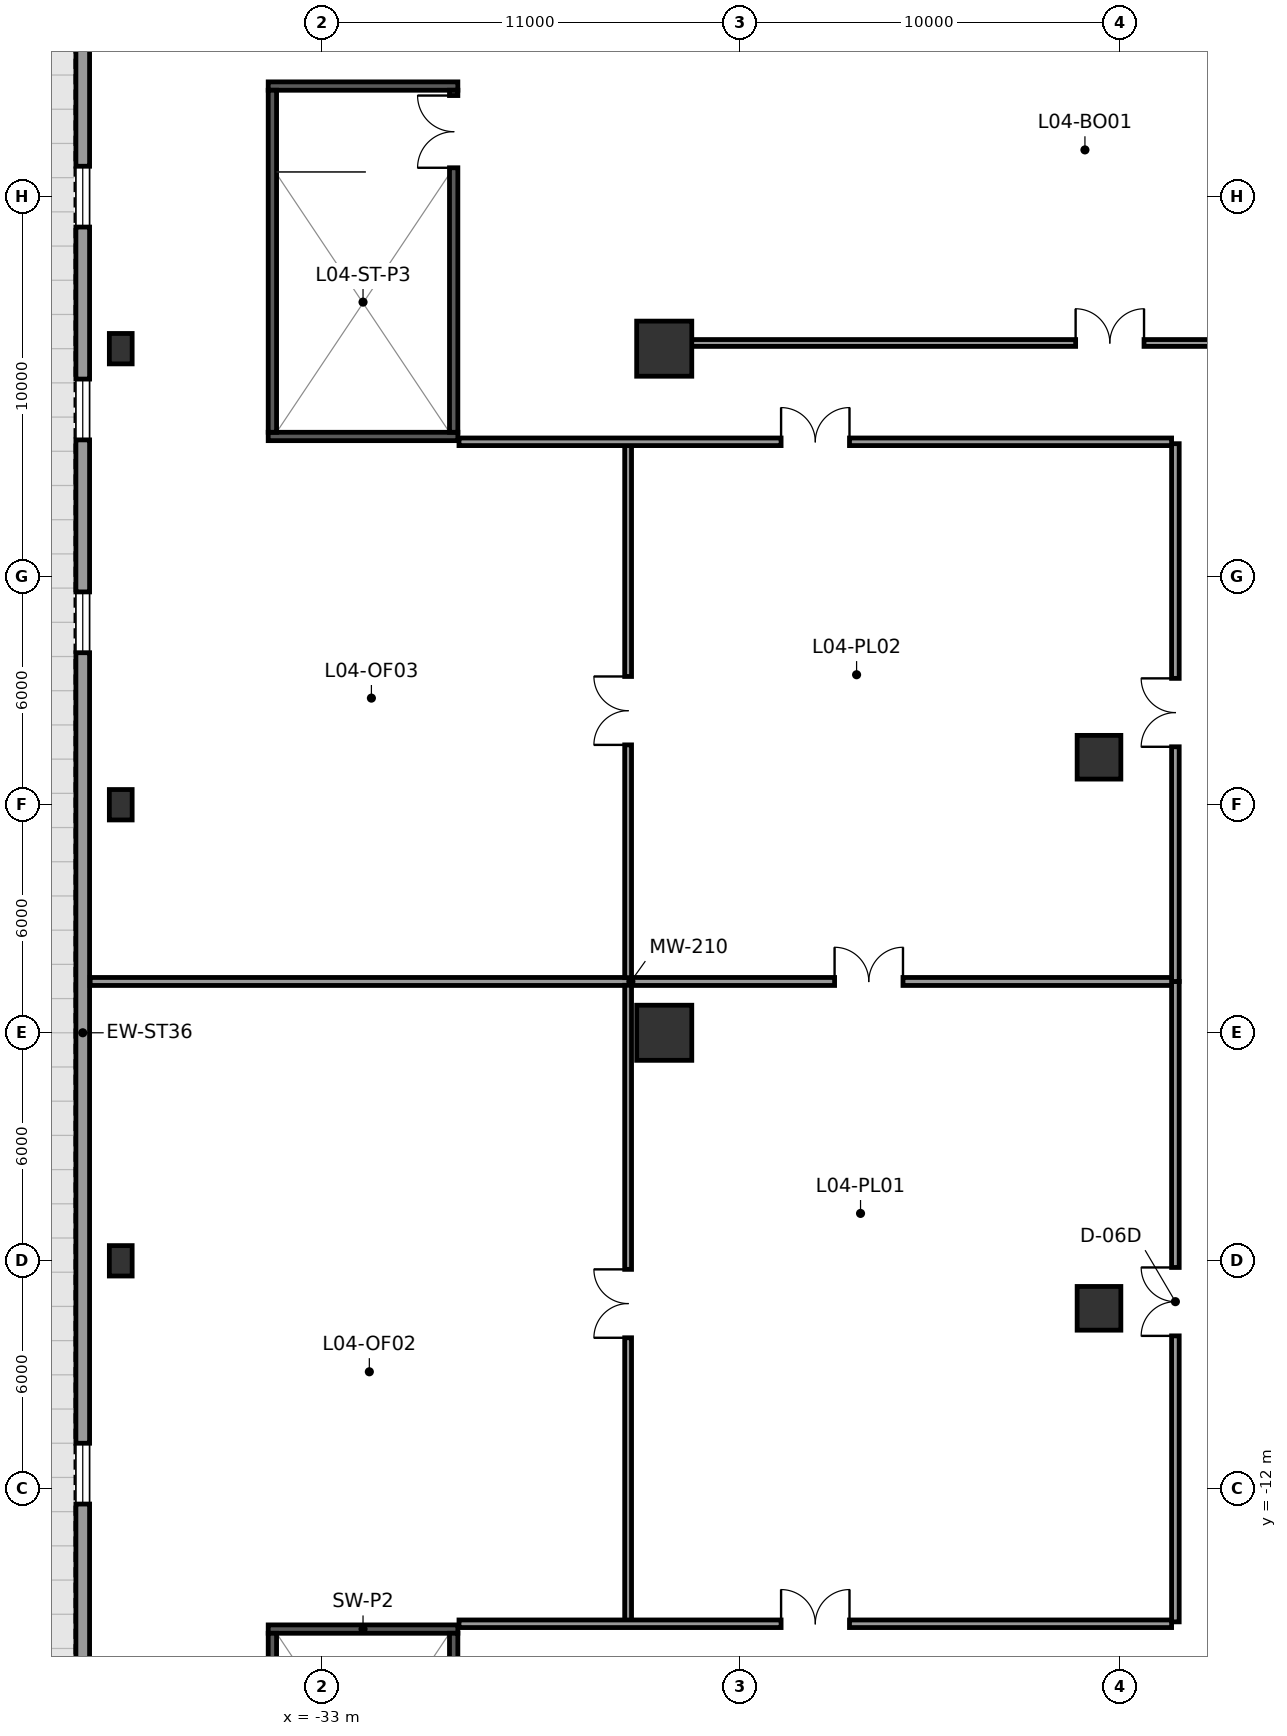
"""IFC4 building model, lengths in metres.
Left out: names, types, materials, properties, quantities, classifications, styles, units other than length and angle.
Written with IfcOpenShell. Run it as: python <this file> out.ifc"""

import sys

from ifc_helpers import new_model, si_unit, direction, frame, frame_2d, origin, origin_2d, place, context, subcontext, project, spatial, rectangle, hollow_rectangle, extrude, element, fill, save


model = new_model("IFC4")
c1 = context("Model", 3, precision=1e-05, world=origin(), true_north=direction((0.0, 1.0)))
c2 = subcontext(c1, "Body", "Model", "MODEL_VIEW")
j1 = project(units=[si_unit("LENGTHUNIT", "METRE"), si_unit("PLANEANGLEUNIT", "RADIAN")], contexts=[c1])
p1 = place(None, origin())
s1 = spatial("IfcSite", under=j1, at=p1, CompositionType="ELEMENT")
p2 = place(p1, origin())
s2 = spatial("IfcBuilding", under=s1, at=p2, CompositionType="ELEMENT")
p3 = place(p2, frame((0.0, 0.0, 23.5)))
s3 = spatial("IfcBuildingStorey", under=s2, at=p3, CompositionType="ELEMENT", Elevation=23.5)
for number, where, z_axis, x_axis in (
    (1, (-12.56, -7.25, 0.0), (0.0, 0.0, 1.0), (1.0, 0.0, 0.0)),
    (2, (-12.56, 7.25, 0.0), (0.0, 0.0, 1.0), (1.0, 0.0, 0.0)),
):
    element("IfcColumn", number, at=place(p3, frame(where, z_axis=z_axis, x_axis=x_axis)), inside=s3, PredefinedType="COLUMN", context=c2, shape_type="SweptSolid", body=[
        extrude(rectangle(XDim=1.15, YDim=1.15, at=origin_2d()), origin(), (0.0, 0.0, 1.0), 5.5),
    ])
for number, where, z_axis, x_axis in (
    (3, (-24.0, 0.0, 0.0), (0.0, 0.0, 1.0), (1.0, 0.0, 0.0)),
    (4, (-24.0, 18.0, 0.0), (0.0, 0.0, 1.0), (1.0, 0.0, 0.0)),
):
    element("IfcColumn", number, at=place(p3, frame(where, z_axis=z_axis, x_axis=x_axis)), inside=s3, PredefinedType="COLUMN", context=c2, shape_type="SweptSolid", body=[
        extrude(rectangle(XDim=1.45, YDim=1.45, at=origin_2d()), origin(), (0.0, 0.0, 1.0), 5.5),
    ])
for number, where, z_axis, x_axis in (
    (5, (-38.3, -6.0, 0.0), (0.0, 0.0, 1.0), (1.0, 0.0, 0.0)),
    (6, (-38.3, 6.0, 0.0), (0.0, 0.0, 1.0), (1.0, 0.0, 0.0)),
    (7, (-38.3, 18.0, 0.0), (0.0, 0.0, 1.0), (1.0, 0.0, 0.0)),
):
    element("IfcColumn", number, at=place(p3, frame(where, z_axis=z_axis, x_axis=x_axis)), inside=s3, PredefinedType="COLUMN", context=c2, shape_type="SweptSolid", body=[
        extrude(hollow_rectangle(XDim=0.6, YDim=0.8, WallThickness=0.05, at=origin_2d()), origin(), (0.0, 0.0, 1.0), 5.5),
    ])
p4 = place(p3, frame((-39.3, -28.4, 0.0), z_axis=(0.0, 0.0, 1.0), x_axis=(0.0, 1.0, 0.0)))
e8 = element("IfcWall", 8, at=p4, inside=s3, PredefinedType="STANDARD", context=c2, shape_type="SweptSolid", body=[
    extrude(rectangle(XDim=56.8, YDim=0.36, at=frame_2d((28.4, 0.0))), origin(), (0.0, 0.0, 1.0), 5.15),
])
p5 = place(p4, frame((4.8, 0.0, 0.9)))
e9 = element("IfcOpeningElement", 9, at=p5, cuts=e8, PredefinedType="OPENING", context=c2, shape_type="SweptSolid", body=[
    extrude(rectangle(XDim=1.6, YDim=2.6, at=frame_2d((0.8, 1.3))), frame((0.0, 0.19, 0.0), z_axis=(0.0, -1.0, 0.0), x_axis=(1.0, 0.0, 0.0)), (0.0, 0.0, 1.0), 0.38),
])
p6 = place(p4, frame((16.0, 0.0, 0.9)))
e10 = element("IfcOpeningElement", 10, at=p6, cuts=e8, PredefinedType="OPENING", context=c2, shape_type="SweptSolid", body=[
    extrude(rectangle(XDim=1.6, YDim=2.6, at=frame_2d((0.8, 1.3))), frame((0.0, 0.19, 0.0), z_axis=(0.0, -1.0, 0.0), x_axis=(1.0, 0.0, 0.0)), (0.0, 0.0, 1.0), 0.38),
])
p7 = place(p4, frame((38.4, 0.0, 0.9)))
e11 = element("IfcOpeningElement", 11, at=p7, cuts=e8, PredefinedType="OPENING", context=c2, shape_type="SweptSolid", body=[
    extrude(rectangle(XDim=1.6, YDim=2.6, at=frame_2d((0.8, 1.3))), frame((0.0, 0.19, 0.0), z_axis=(0.0, -1.0, 0.0), x_axis=(1.0, 0.0, 0.0)), (0.0, 0.0, 1.0), 0.38),
])
p8 = place(p4, frame((44.0, 0.0, 0.9)))
e12 = element("IfcOpeningElement", 12, at=p8, cuts=e8, PredefinedType="OPENING", context=c2, shape_type="SweptSolid", body=[
    extrude(rectangle(XDim=1.6, YDim=2.6, at=frame_2d((0.8, 1.3))), frame((0.0, 0.19, 0.0), z_axis=(0.0, -1.0, 0.0), x_axis=(1.0, 0.0, 0.0)), (0.0, 0.0, 1.0), 0.38),
])
p9 = place(p4, frame((49.6, 0.0, 0.9)))
e13 = element("IfcOpeningElement", 13, at=p9, cuts=e8, PredefinedType="OPENING", context=c2, shape_type="SweptSolid", body=[
    extrude(rectangle(XDim=1.6, YDim=2.6, at=frame_2d((0.8, 1.3))), frame((0.0, 0.19, 0.0), z_axis=(0.0, -1.0, 0.0), x_axis=(1.0, 0.0, 0.0)), (0.0, 0.0, 1.0), 0.38),
])
p10 = place(p3, frame((-34.42, -15.69, 0.0), z_axis=(0.0, 0.0, 1.0), x_axis=(1.0, 0.0, 0.0)))
e14 = element("IfcWall", 14, at=p10, inside=s3, PredefinedType="SHEAR", context=c2, shape_type="SweptSolid", body=[
    extrude(rectangle(XDim=4.99, YDim=0.22, at=frame_2d((2.495, 0.0))), origin(), (0.0, 0.0, 1.0), 5.15),
])
p11 = place(p3, frame((-34.31, -24.8, 0.0), z_axis=(0.0, 0.0, 1.0), x_axis=(0.0, 1.0, 0.0)))
e15 = element("IfcWall", 15, at=p11, inside=s3, PredefinedType="SHEAR", context=c2, shape_type="SweptSolid", body=[
    extrude(rectangle(XDim=9.0, YDim=0.22, at=frame_2d((4.5, 0.0))), origin(), (0.0, 0.0, 1.0), 5.15),
])
p12 = place(p3, frame((-29.54, -24.8, 0.0), z_axis=(0.0, 0.0, 1.0), x_axis=(0.0, 1.0, 0.0)))
e16 = element("IfcWall", 16, at=p12, inside=s3, PredefinedType="SHEAR", context=c2, shape_type="SweptSolid", body=[
    extrude(rectangle(XDim=9.0, YDim=0.22, at=frame_2d((4.5, 0.0))), origin(), (0.0, 0.0, 1.0), 5.15),
])
p13 = place(p12, frame((0.14, 0.0, 0.0)))
e17 = element("IfcOpeningElement", 17, at=p13, cuts=e16, PredefinedType="OPENING", context=c2, shape_type="SweptSolid", body=[
    extrude(rectangle(XDim=1.9, YDim=2.2, at=frame_2d((0.95, 1.1))), frame((0.0, 0.12, 0.0), z_axis=(0.0, -1.0, 0.0), x_axis=(1.0, 0.0, 0.0)), (0.0, 0.0, 1.0), 0.24),
])
for number, where, z_axis, x_axis in (
    (18, (-34.42, 15.69, 0.0), (0.0, 0.0, 1.0), (1.0, 0.0, 0.0)),
    (19, (-34.42, 24.91, 0.0), (0.0, 0.0, 1.0), (1.0, 0.0, 0.0)),
):
    element("IfcWall", number, at=place(p3, frame(where, z_axis=z_axis, x_axis=x_axis)), inside=s3, PredefinedType="SHEAR", context=c2, shape_type="SweptSolid", body=[
        extrude(rectangle(XDim=4.99, YDim=0.22, at=frame_2d((2.495, 0.0))), origin(), (0.0, 0.0, 1.0), 5.15),
    ])
p14 = place(p3, frame((-34.31, 15.8, 0.0), z_axis=(0.0, 0.0, 1.0), x_axis=(0.0, 1.0, 0.0)))
e20 = element("IfcWall", 20, at=p14, inside=s3, PredefinedType="SHEAR", context=c2, shape_type="SweptSolid", body=[
    extrude(rectangle(XDim=9.0, YDim=0.22, at=frame_2d((4.5, 0.0))), origin(), (0.0, 0.0, 1.0), 5.15),
])
p15 = place(p3, frame((-29.54, 15.8, 0.0), z_axis=(0.0, 0.0, 1.0), x_axis=(0.0, 1.0, 0.0)))
e21 = element("IfcWall", 21, at=p15, inside=s3, PredefinedType="SHEAR", context=c2, shape_type="SweptSolid", body=[
    extrude(rectangle(XDim=9.0, YDim=0.22, at=frame_2d((4.5, 0.0))), origin(), (0.0, 0.0, 1.0), 5.15),
])
p16 = place(p15, frame((6.96, 0.0, 0.0)))
e22 = element("IfcOpeningElement", 22, at=p16, cuts=e21, PredefinedType="OPENING", context=c2, shape_type="SweptSolid", body=[
    extrude(rectangle(XDim=1.9, YDim=2.2, at=frame_2d((0.95, 1.1))), frame((0.0, 0.12, 0.0), z_axis=(0.0, -1.0, 0.0), x_axis=(1.0, 0.0, 0.0)), (0.0, 0.0, 1.0), 0.24),
])
p17 = place(p3, frame((-10.55, -15.5, 0.0), z_axis=(0.0, 0.0, 1.0), x_axis=(0.0, 1.0, 0.0)))
e23 = element("IfcWall", 23, at=p17, inside=s3, PredefinedType="PARTITIONING", context=c2, shape_type="SweptSolid", body=[
    extrude(rectangle(XDim=16.85, YDim=0.2, at=frame_2d((8.425, 0.0))), origin(), (0.0, 0.0, 1.0), 5.15),
])
p18 = place(p17, frame((7.525, 0.0, 0.0)))
e24 = element("IfcOpeningElement", 24, at=p18, cuts=e23, PredefinedType="OPENING", context=c2, shape_type="SweptSolid", body=[
    extrude(rectangle(XDim=1.8, YDim=2.2, at=frame_2d((0.9, 1.1))), frame((0.0, 0.11, 0.0), z_axis=(0.0, -1.0, 0.0), x_axis=(1.0, 0.0, 0.0)), (0.0, 0.0, 1.0), 0.22),
])
p19 = place(p3, frame((-10.55, 1.35, 0.0), z_axis=(0.0, 0.0, 1.0), x_axis=(0.0, 1.0, 0.0)))
e25 = element("IfcWall", 25, at=p19, inside=s3, PredefinedType="PARTITIONING", context=c2, shape_type="SweptSolid", body=[
    extrude(rectangle(XDim=14.15, YDim=0.2, at=frame_2d((7.075, 0.0))), origin(), (0.0, 0.0, 1.0), 5.15),
])
p20 = place(p19, frame((6.175, 0.0, 0.0)))
e26 = element("IfcOpeningElement", 26, at=p20, cuts=e25, PredefinedType="OPENING", context=c2, shape_type="SweptSolid", body=[
    extrude(rectangle(XDim=1.8, YDim=2.2, at=frame_2d((0.9, 1.1))), frame((0.0, 0.11, 0.0), z_axis=(0.0, -1.0, 0.0), x_axis=(1.0, 0.0, 0.0)), (0.0, 0.0, 1.0), 0.22),
])
p21 = place(p3, frame((-39.105, 1.35, 0.0), z_axis=(0.0, 0.0, 1.0), x_axis=(1.0, 0.0, 0.0)))
e27 = element("IfcWall", 27, at=p21, inside=s3, PredefinedType="MOVABLE", context=c2, shape_type="SweptSolid", body=[
    extrude(rectangle(XDim=28.455, YDim=0.21, at=frame_2d((14.228, 0.0))), origin(), (0.0, 0.0, 1.0), 5.15),
])
p22 = place(p21, frame((19.588, 0.0, 0.0)))
e28 = element("IfcOpeningElement", 28, at=p22, cuts=e27, PredefinedType="OPENING", context=c2, shape_type="SweptSolid", body=[
    extrude(rectangle(XDim=1.8, YDim=2.2, at=frame_2d((0.9, 1.1))), frame((0.0, 0.115, 0.0), z_axis=(0.0, -1.0, 0.0), x_axis=(1.0, 0.0, 0.0)), (0.0, 0.0, 1.0), 0.23),
])
p23 = place(p3, frame((-24.95, -15.5, 0.0), z_axis=(0.0, 0.0, 1.0), x_axis=(0.0, 1.0, 0.0)))
e29 = element("IfcWall", 29, at=p23, inside=s3, PredefinedType="PARTITIONING", context=c2, shape_type="SweptSolid", body=[
    extrude(rectangle(XDim=16.75, YDim=0.18, at=frame_2d((8.375, 0.0))), origin(), (0.0, 0.0, 1.0), 5.15),
])
p24 = place(p23, frame((7.475, 0.0, 0.0)))
e30 = element("IfcOpeningElement", 30, at=p24, cuts=e29, PredefinedType="OPENING", context=c2, shape_type="SweptSolid", body=[
    extrude(rectangle(XDim=1.8, YDim=2.2, at=frame_2d((0.9, 1.1))), frame((0.0, 0.1, 0.0), z_axis=(0.0, -1.0, 0.0), x_axis=(1.0, 0.0, 0.0)), (0.0, 0.0, 1.0), 0.2),
])
p25 = place(p3, frame((-24.95, 1.45, 0.0), z_axis=(0.0, 0.0, 1.0), x_axis=(0.0, 1.0, 0.0)))
e31 = element("IfcWall", 31, at=p25, inside=s3, PredefinedType="PARTITIONING", context=c2, shape_type="SweptSolid", body=[
    extrude(rectangle(XDim=14.05, YDim=0.18, at=frame_2d((7.025, 0.0))), origin(), (0.0, 0.0, 1.0), 5.15),
])
p26 = place(p25, frame((6.125, 0.0, 0.0)))
e32 = element("IfcOpeningElement", 32, at=p26, cuts=e31, PredefinedType="OPENING", context=c2, shape_type="SweptSolid", body=[
    extrude(rectangle(XDim=1.8, YDim=2.2, at=frame_2d((0.9, 1.1))), frame((0.0, 0.1, 0.0), z_axis=(0.0, -1.0, 0.0), x_axis=(1.0, 0.0, 0.0)), (0.0, 0.0, 1.0), 0.2),
])
p27 = place(p3, frame((-29.4, 15.55, 0.0), z_axis=(0.0, 0.0, 1.0), x_axis=(1.0, 0.0, 0.0)))
e33 = element("IfcWall", 33, at=p27, inside=s3, PredefinedType="PARTITIONING", context=c2, shape_type="SweptSolid", body=[
    extrude(rectangle(XDim=18.75, YDim=0.2, at=frame_2d((9.375, 0.0))), origin(), (0.0, 0.0, 1.0), 5.15),
])
p28 = place(p27, frame((8.475, 0.0, 0.0)))
e34 = element("IfcOpeningElement", 34, at=p28, cuts=e33, PredefinedType="OPENING", context=c2, shape_type="SweptSolid", body=[
    extrude(rectangle(XDim=1.8, YDim=2.2, at=frame_2d((0.9, 1.1))), frame((0.0, 0.11, 0.0), z_axis=(0.0, -1.0, 0.0), x_axis=(1.0, 0.0, 0.0)), (0.0, 0.0, 1.0), 0.22),
])
p29 = place(p3, frame((-29.4, -15.55, 0.0), z_axis=(0.0, 0.0, 1.0), x_axis=(1.0, 0.0, 0.0)))
e35 = element("IfcWall", 35, at=p29, inside=s3, PredefinedType="PARTITIONING", context=c2, shape_type="SweptSolid", body=[
    extrude(rectangle(XDim=18.75, YDim=0.2, at=frame_2d((9.375, 0.0))), origin(), (0.0, 0.0, 1.0), 5.15),
])
p30 = place(p29, frame((8.475, 0.0, 0.0)))
e36 = element("IfcOpeningElement", 36, at=p30, cuts=e35, PredefinedType="OPENING", context=c2, shape_type="SweptSolid", body=[
    extrude(rectangle(XDim=1.8, YDim=2.2, at=frame_2d((0.9, 1.1))), frame((0.0, 0.11, 0.0), z_axis=(0.0, -1.0, 0.0), x_axis=(1.0, 0.0, 0.0)), (0.0, 0.0, 1.0), 0.22),
])
p31 = place(p3, frame((-23.6, 18.15, 0.0), z_axis=(0.0, 0.0, 1.0), x_axis=(1.0, 0.0, 0.0)))
e37 = element("IfcWall", 37, at=p31, inside=s3, PredefinedType="PARTITIONING", context=c2, shape_type="SweptSolid", body=[
    extrude(rectangle(XDim=37.75, YDim=0.18, at=frame_2d((18.875, 0.0))), origin(), (0.0, 0.0, 1.0), 3.33),
])
p32 = place(p31, frame((10.425, 0.0, 0.0)))
e38 = element("IfcOpeningElement", 38, at=p32, cuts=e37, PredefinedType="OPENING", context=c2, shape_type="SweptSolid", body=[
    extrude(rectangle(XDim=1.8, YDim=2.2, at=frame_2d((0.9, 1.1))), frame((0.0, 0.1, 0.0), z_axis=(0.0, -1.0, 0.0), x_axis=(1.0, 0.0, 0.0)), (0.0, 0.0, 1.0), 0.2),
])
p33 = place(p6, origin())
e39 = element("IfcWindow", 39, at=p33, inside=s3, PartitioningType="DOUBLE_PANEL_VERTICAL", PredefinedType="WINDOW", context=c2, shape_type="SweptSolid", body=[
    extrude(rectangle(XDim=1.6, YDim=2.6, at=frame_2d((0.8, 1.3))), frame((0.0, 0.03, 0.0), z_axis=(0.0, -1.0, 0.0), x_axis=(1.0, 0.0, 0.0)), (0.0, 0.0, 1.0), 0.06),
])
fill(e10, e39)
p34 = place(p7, origin())
e40 = element("IfcWindow", 40, at=p34, inside=s3, PartitioningType="DOUBLE_PANEL_VERTICAL", PredefinedType="WINDOW", context=c2, shape_type="SweptSolid", body=[
    extrude(rectangle(XDim=1.6, YDim=2.6, at=frame_2d((0.8, 1.3))), frame((0.0, 0.03, 0.0), z_axis=(0.0, -1.0, 0.0), x_axis=(1.0, 0.0, 0.0)), (0.0, 0.0, 1.0), 0.06),
])
fill(e11, e40)
p35 = place(p8, origin())
e41 = element("IfcWindow", 41, at=p35, inside=s3, PartitioningType="DOUBLE_PANEL_VERTICAL", PredefinedType="WINDOW", context=c2, shape_type="SweptSolid", body=[
    extrude(rectangle(XDim=1.6, YDim=2.6, at=frame_2d((0.8, 1.3))), frame((0.0, 0.03, 0.0), z_axis=(0.0, -1.0, 0.0), x_axis=(1.0, 0.0, 0.0)), (0.0, 0.0, 1.0), 0.06),
])
fill(e12, e41)
p36 = place(p9, origin())
e42 = element("IfcWindow", 42, at=p36, inside=s3, PartitioningType="DOUBLE_PANEL_VERTICAL", PredefinedType="WINDOW", context=c2, shape_type="SweptSolid", body=[
    extrude(rectangle(XDim=1.6, YDim=2.6, at=frame_2d((0.8, 1.3))), frame((0.0, 0.03, 0.0), z_axis=(0.0, -1.0, 0.0), x_axis=(1.0, 0.0, 0.0)), (0.0, 0.0, 1.0), 0.06),
])
fill(e13, e42)
p37 = place(p16, origin())
e43 = element("IfcDoor", 43, at=p37, inside=s3, OperationType="DOUBLE_DOOR_SINGLE_SWING", PredefinedType="DOOR", context=c2, shape_type="SweptSolid", body=[
    extrude(rectangle(XDim=1.9, YDim=2.2, at=frame_2d((0.95, 1.1))), frame((0.0, 0.025, 0.0), z_axis=(0.0, -1.0, 0.0), x_axis=(1.0, 0.0, 0.0)), (0.0, 0.0, 1.0), 0.05),
])
fill(e22, e43)
p38 = place(p18, origin())
e44 = element("IfcDoor", 44, at=p38, inside=s3, OperationType="DOUBLE_DOOR_SINGLE_SWING", PredefinedType="DOOR", context=c2, shape_type="SweptSolid", body=[
    extrude(rectangle(XDim=1.8, YDim=2.2, at=frame_2d((0.9, 1.1))), frame((0.0, 0.025, 0.0), z_axis=(0.0, -1.0, 0.0), x_axis=(1.0, 0.0, 0.0)), (0.0, 0.0, 1.0), 0.05),
])
fill(e24, e44)
p39 = place(p20, origin())
e45 = element("IfcDoor", 45, at=p39, inside=s3, OperationType="DOUBLE_DOOR_SINGLE_SWING", PredefinedType="DOOR", context=c2, shape_type="SweptSolid", body=[
    extrude(rectangle(XDim=1.8, YDim=2.2, at=frame_2d((0.9, 1.1))), frame((0.0, 0.025, 0.0), z_axis=(0.0, -1.0, 0.0), x_axis=(1.0, 0.0, 0.0)), (0.0, 0.0, 1.0), 0.05),
])
fill(e26, e45)
p40 = place(p22, origin())
e46 = element("IfcDoor", 46, at=p40, inside=s3, OperationType="DOUBLE_DOOR_SINGLE_SWING", PredefinedType="DOOR", context=c2, shape_type="SweptSolid", body=[
    extrude(rectangle(XDim=1.8, YDim=2.2, at=frame_2d((0.9, 1.1))), frame((0.0, 0.025, 0.0), z_axis=(0.0, -1.0, 0.0), x_axis=(1.0, 0.0, 0.0)), (0.0, 0.0, 1.0), 0.05),
])
fill(e28, e46)
p41 = place(p24, origin())
e47 = element("IfcDoor", 47, at=p41, inside=s3, OperationType="DOUBLE_DOOR_SINGLE_SWING", PredefinedType="DOOR", context=c2, shape_type="SweptSolid", body=[
    extrude(rectangle(XDim=1.8, YDim=2.2, at=frame_2d((0.9, 1.1))), frame((0.0, 0.025, 0.0), z_axis=(0.0, -1.0, 0.0), x_axis=(1.0, 0.0, 0.0)), (0.0, 0.0, 1.0), 0.05),
])
fill(e30, e47)
p42 = place(p26, origin())
e48 = element("IfcDoor", 48, at=p42, inside=s3, OperationType="DOUBLE_DOOR_SINGLE_SWING", PredefinedType="DOOR", context=c2, shape_type="SweptSolid", body=[
    extrude(rectangle(XDim=1.8, YDim=2.2, at=frame_2d((0.9, 1.1))), frame((0.0, 0.025, 0.0), z_axis=(0.0, -1.0, 0.0), x_axis=(1.0, 0.0, 0.0)), (0.0, 0.0, 1.0), 0.05),
])
fill(e32, e48)
p43 = place(p28, origin())
e49 = element("IfcDoor", 49, at=p43, inside=s3, OperationType="DOUBLE_DOOR_SINGLE_SWING", PredefinedType="DOOR", context=c2, shape_type="SweptSolid", body=[
    extrude(rectangle(XDim=1.8, YDim=2.2, at=frame_2d((0.9, 1.1))), frame((0.0, 0.025, 0.0), z_axis=(0.0, -1.0, 0.0), x_axis=(1.0, 0.0, 0.0)), (0.0, 0.0, 1.0), 0.05),
])
fill(e34, e49)
p44 = place(p30, origin())
e50 = element("IfcDoor", 50, at=p44, inside=s3, OperationType="DOUBLE_DOOR_SINGLE_SWING", PredefinedType="DOOR", context=c2, shape_type="SweptSolid", body=[
    extrude(rectangle(XDim=1.8, YDim=2.2, at=frame_2d((0.9, 1.1))), frame((0.0, 0.025, 0.0), z_axis=(0.0, -1.0, 0.0), x_axis=(1.0, 0.0, 0.0)), (0.0, 0.0, 1.0), 0.05),
])
fill(e36, e50)
p45 = place(p32, origin())
e51 = element("IfcDoor", 51, at=p45, inside=s3, OperationType="DOUBLE_DOOR_SINGLE_SWING", PredefinedType="DOOR", context=c2, shape_type="SweptSolid", body=[
    extrude(rectangle(XDim=1.8, YDim=2.2, at=frame_2d((0.9, 1.1))), frame((0.0, 0.025, 0.0), z_axis=(0.0, -1.0, 0.0), x_axis=(1.0, 0.0, 0.0)), (0.0, 0.0, 1.0), 0.05),
])
fill(e38, e51)
save(model, sys.argv[1])
